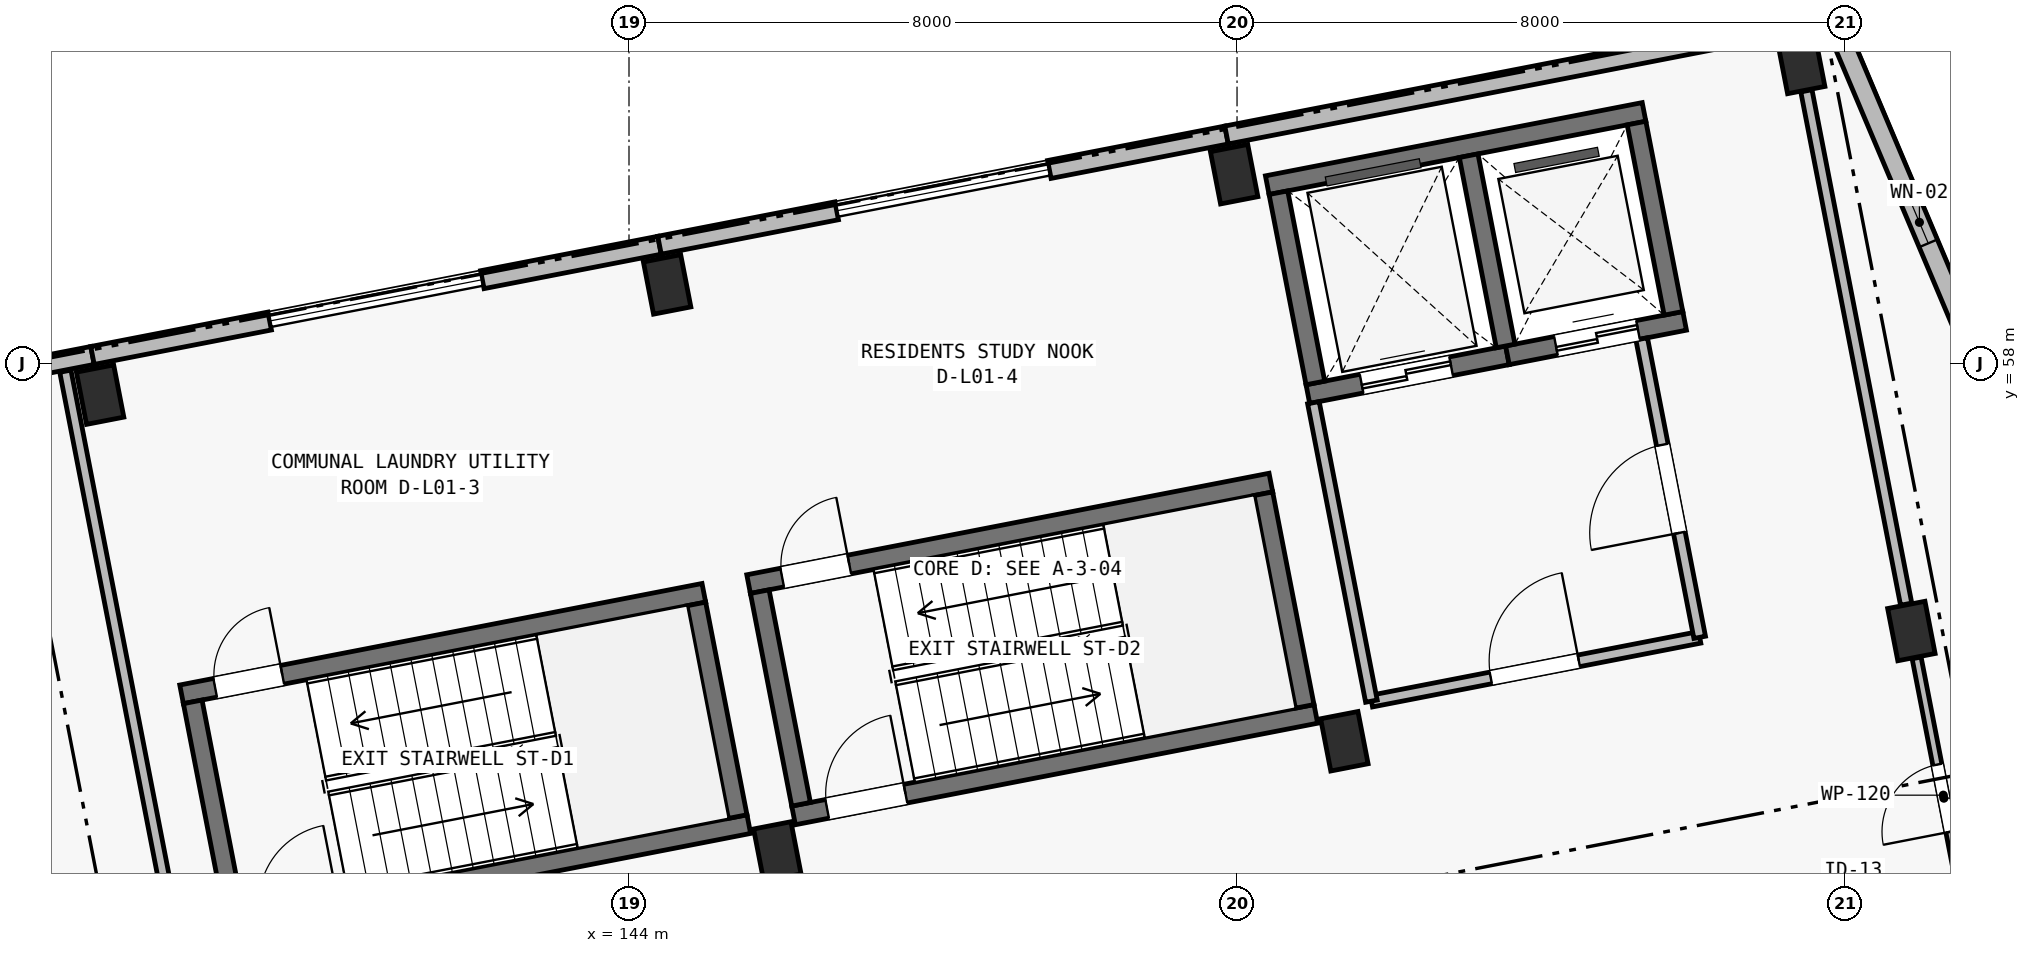
"""IFC4 building model, lengths in metres.
Left out: names, types, materials, properties, quantities, classifications, styles, units other than length and angle.
Written with IfcOpenShell. Run it as: python <this file> out.ifc"""

import sys

from ifc_helpers import new_model, si_unit, direction, frame, frame_2d, origin, origin_2d, place, context, subcontext, project, spatial, rectangle, extrude, element, fill, save


model = new_model("IFC4")
c1 = context("Model", 3, precision=1e-05, world=origin(), true_north=direction((0.0, 1.0)))
c2 = subcontext(c1, "Body", "Model", "MODEL_VIEW")
j1 = project(units=[si_unit("LENGTHUNIT", "METRE"), si_unit("PLANEANGLEUNIT", "RADIAN")], contexts=[c1])
p1 = place(None, origin())
s1 = spatial("IfcSite", under=j1, at=p1, CompositionType="ELEMENT")
p2 = place(p1, origin())
s2 = spatial("IfcBuilding", under=s1, at=p2, CompositionType="ELEMENT")
p3 = place(p2, frame((0.0, 0.0, 4.5)))
s3 = spatial("IfcBuildingStorey", under=s2, at=p3, CompositionType="ELEMENT", Elevation=4.5)
for number, where, z_axis, x_axis in (
    (1, (137.041, 57.59, 0.0), (0.0, 0.0, 1.0), (0.982, 0.191, 0.0)),
    (2, (145.952, 51.58, 0.0), (0.0, 0.0, 1.0), (0.982, 0.191, 0.0)),
    (3, (144.502, 59.041, 0.0), (0.0, 0.0, 1.0), (0.982, 0.191, 0.0)),
    (4, (153.412, 53.03, 0.0), (0.0, 0.0, 1.0), (0.982, 0.191, 0.0)),
    (5, (151.962, 60.491, 0.0), (0.0, 0.0, 1.0), (0.982, 0.191, 0.0)),
    (6, (160.873, 54.48, 0.0), (0.0, 0.0, 1.0), (0.982, 0.191, 0.0)),
    (7, (159.422, 61.941, 0.0), (0.0, 0.0, 1.0), (0.982, 0.191, 0.0)),
):
    element("IfcColumn", number, at=place(p3, frame(where, z_axis=z_axis, x_axis=x_axis)), inside=s3, PredefinedType="COLUMN", context=c2, shape_type="SweptSolid", body=[
        extrude(rectangle(XDim=0.5, YDim=0.7, at=origin_2d()), origin(), (0.0, 0.0, 1.0), 3.9),
    ])
p4 = place(p3, frame((152.397, 60.346, 0.0), z_axis=(0.0, 0.0, 1.0), x_axis=(0.981635261308, 0.190767433692, 0.0)))
e8 = element("IfcWall", 8, at=p4, inside=s3, PredefinedType="SHEAR", context=c2, shape_type="SweptSolid", body=[
    extrude(rectangle(XDim=5.05, YDim=0.25, at=frame_2d((2.525, 0.0))), origin(), (0.0, 0.0, 1.0), 3.9),
])
p5 = place(p3, frame((152.932, 57.598, 0.0), z_axis=(0.0, 0.0, 1.0), x_axis=(0.981636759622, 0.190759723627, 0.0)))
e9 = element("IfcWall", 9, at=p5, inside=s3, PredefinedType="SHEAR", context=c2, shape_type="SweptSolid", body=[
    extrude(rectangle(XDim=2.675, YDim=0.25, at=frame_2d((1.337, 0.0))), origin(), (0.0, 0.0, 1.0), 3.9),
])
p6 = place(p5, frame((0.72, 0.0, 0.0)))
e10 = element("IfcOpeningElement", 10, at=p6, cuts=e9, PredefinedType="OPENING", context=c2, shape_type="SweptSolid", body=[
    extrude(rectangle(XDim=1.2, YDim=2.2, at=frame_2d((0.6, 1.1))), frame((0.0, 0.14, 0.0), z_axis=(0.0, -1.0, 0.0), x_axis=(1.0, 0.0, 0.0)), (0.0, 0.0, 1.0), 0.28),
])
p7 = place(p3, frame((155.558, 58.108, 0.0), z_axis=(0.0, 0.0, 1.0), x_axis=(0.981633573872, 0.190776116556, 0.0)))
e11 = element("IfcWall", 11, at=p7, inside=s3, PredefinedType="SHEAR", context=c2, shape_type="SweptSolid", body=[
    extrude(rectangle(XDim=2.375, YDim=0.25, at=frame_2d((1.188, 0.0))), origin(), (0.0, 0.0, 1.0), 3.9),
])
p8 = place(p7, frame((0.65, 0.0, 0.0)))
e12 = element("IfcOpeningElement", 12, at=p8, cuts=e11, PredefinedType="OPENING", context=c2, shape_type="SweptSolid", body=[
    extrude(rectangle(XDim=1.1, YDim=2.15, at=frame_2d((0.55, 1.075))), frame((0.0, 0.14, 0.0), z_axis=(0.0, -1.0, 0.0), x_axis=(1.0, 0.0, 0.0)), (0.0, 0.0, 1.0), 0.28),
])
for number, where, z_axis, x_axis in (
    (13, (153.031, 57.744, 0.0), (0.0, 0.0, 1.0), (-0.191, 0.982, 0.0)),
    (14, (155.534, 58.231, 0.0), (0.0, 0.0, 1.0), (-0.191, 0.982, 0.0)),
    (15, (157.742, 58.66, 0.0), (0.0, 0.0, 1.0), (-0.191, 0.982, 0.0)),
):
    element("IfcWall", number, at=place(p3, frame(where, z_axis=z_axis, x_axis=x_axis)), inside=s3, PredefinedType="SHEAR", context=c2, shape_type="SweptSolid", body=[
        extrude(rectangle(XDim=2.55, YDim=0.25, at=frame_2d((1.275, 0.0))), origin(), (0.0, 0.0, 1.0), 3.9),
    ])
p9 = place(p3, frame((138.113, 53.647, 0.0), z_axis=(0.0, 0.0, 1.0), x_axis=(0.981626097708, 0.19081458094, 0.0)))
e16 = element("IfcWall", 16, at=p9, inside=s3, PredefinedType="SHEAR", context=c2, shape_type="SweptSolid", body=[
    extrude(rectangle(XDim=7.0, YDim=0.25, at=frame_2d((3.5, 0.0))), origin(), (0.0, 0.0, 1.0), 3.9),
])
p10 = place(p9, frame((0.45, 0.0, 0.0)))
e17 = element("IfcOpeningElement", 17, at=p10, cuts=e16, PredefinedType="OPENING", context=c2, shape_type="SweptSolid", body=[
    extrude(rectangle(XDim=0.9, YDim=2.1, at=frame_2d((0.45, 1.05))), frame((0.0, 0.14, 0.0), z_axis=(0.0, -1.0, 0.0), x_axis=(1.0, 0.0, 0.0)), (0.0, 0.0, 1.0), 0.28),
])
p11 = place(p3, frame((138.705, 50.604, 0.0), z_axis=(0.0, 0.0, 1.0), x_axis=(0.981626097708, 0.19081458094, 0.0)))
e18 = element("IfcWall", 18, at=p11, inside=s3, PredefinedType="SHEAR", context=c2, shape_type="SweptSolid", body=[
    extrude(rectangle(XDim=7.0, YDim=0.25, at=frame_2d((3.5, 0.0))), origin(), (0.0, 0.0, 1.0), 3.9),
])
p12 = place(p11, frame((0.45, 0.0, 0.0)))
e19 = element("IfcOpeningElement", 19, at=p12, cuts=e18, PredefinedType="OPENING", context=c2, shape_type="SweptSolid", body=[
    extrude(rectangle(XDim=1.05, YDim=2.15, at=frame_2d((0.525, 1.075))), frame((0.0, 0.14, 0.0), z_axis=(0.0, -1.0, 0.0), x_axis=(1.0, 0.0, 0.0)), (0.0, 0.0, 1.0), 0.28),
])
p13 = place(p3, frame((138.804, 50.751, 0.0), z_axis=(0.0, 0.0, 1.0), x_axis=(-0.190858194834, 0.981617618762, 0.0)))
e20 = element("IfcWall", 20, at=p13, inside=s3, PredefinedType="SHEAR", context=c2, shape_type="SweptSolid", body=[
    extrude(rectangle(XDim=2.85, YDim=0.25, at=frame_2d((1.425, 0.0))), origin(), (0.0, 0.0, 1.0), 3.9),
])
p14 = place(p3, frame((145.43, 52.039, 0.0), z_axis=(0.0, 0.0, 1.0), x_axis=(-0.190842147128, 0.981620738819, 0.0)))
e21 = element("IfcWall", 21, at=p14, inside=s3, PredefinedType="SHEAR", context=c2, shape_type="SweptSolid", body=[
    extrude(rectangle(XDim=2.85, YDim=0.25, at=frame_2d((1.425, 0.0))), origin(), (0.0, 0.0, 1.0), 3.9),
])
p15 = place(p3, frame((145.574, 55.098, 0.0), z_axis=(0.0, 0.0, 1.0), x_axis=(0.981626097708, 0.19081458094, 0.0)))
e22 = element("IfcWall", 22, at=p15, inside=s3, PredefinedType="SHEAR", context=c2, shape_type="SweptSolid", body=[
    extrude(rectangle(XDim=7.0, YDim=0.25, at=frame_2d((3.5, 0.0))), origin(), (0.0, 0.0, 1.0), 3.9),
])
p16 = place(p15, frame((0.45, 0.0, 0.0)))
e23 = element("IfcOpeningElement", 23, at=p16, cuts=e22, PredefinedType="OPENING", context=c2, shape_type="SweptSolid", body=[
    extrude(rectangle(XDim=0.9, YDim=2.1, at=frame_2d((0.45, 1.05))), frame((0.0, 0.14, 0.0), z_axis=(0.0, -1.0, 0.0), x_axis=(1.0, 0.0, 0.0)), (0.0, 0.0, 1.0), 0.28),
])
p17 = place(p3, frame((146.165, 52.054, 0.0), z_axis=(0.0, 0.0, 1.0), x_axis=(0.981627367538, 0.190808048312, 0.0)))
e24 = element("IfcWall", 24, at=p17, inside=s3, PredefinedType="SHEAR", context=c2, shape_type="SweptSolid", body=[
    extrude(rectangle(XDim=7.0, YDim=0.25, at=frame_2d((3.5, 0.0))), origin(), (0.0, 0.0, 1.0), 3.9),
])
p18 = place(p17, frame((0.45, 0.0, 0.0)))
e25 = element("IfcOpeningElement", 25, at=p18, cuts=e24, PredefinedType="OPENING", context=c2, shape_type="SweptSolid", body=[
    extrude(rectangle(XDim=1.05, YDim=2.15, at=frame_2d((0.525, 1.075))), frame((0.0, 0.14, 0.0), z_axis=(0.0, -1.0, 0.0), x_axis=(1.0, 0.0, 0.0)), (0.0, 0.0, 1.0), 0.28),
])
for number, where, z_axis, x_axis in (
    (26, (146.264, 52.201, 0.0), (0.0, 0.0, 1.0), (-0.191, 0.982, 0.0)),
    (27, (152.89, 53.489, 0.0), (0.0, 0.0, 1.0), (-0.191, 0.982, 0.0)),
):
    element("IfcWall", number, at=place(p3, frame(where, z_axis=z_axis, x_axis=x_axis)), inside=s3, PredefinedType="SHEAR", context=c2, shape_type="SweptSolid", body=[
        extrude(rectangle(XDim=2.85, YDim=0.25, at=frame_2d((1.425, 0.0))), origin(), (0.0, 0.0, 1.0), 3.9),
    ])
p19 = place(p3, frame((129.481, 56.656, 0.0), z_axis=(0.0, 0.0, 1.0), x_axis=(0.981626422232, 0.190812911449, 0.0)))
e28 = element("IfcWall", 28, at=p19, inside=s3, PredefinedType="SOLIDWALL", context=c2, shape_type="SweptSolid", body=[
    extrude(rectangle(XDim=7.6, YDim=0.24, at=frame_2d((3.8, 0.0))), origin(), (0.0, 0.0, 1.0), 3.65),
])
p20 = place(p19, frame((3.0, 0.0, 0.0)))
e29 = element("IfcOpeningElement", 29, at=p20, cuts=e28, PredefinedType="OPENING", context=c2, shape_type="SweptSolid", body=[
    extrude(rectangle(XDim=1.6, YDim=2.15, at=frame_2d((0.8, 1.075))), frame((0.0, 0.135, 0.0), z_axis=(0.0, -1.0, 0.0), x_axis=(1.0, 0.0, 0.0)), (0.0, 0.0, 1.0), 0.27),
])
for number, where, z_axis, x_axis in (
    (30, (136.941, 58.106, 0.0), (0.0, 0.0, 1.0), (0.982, 0.191, 0.0)),
    (31, (142.07, 59.103, 0.0), (0.0, 0.0, 1.0), (0.982, 0.191, 0.0)),
):
    element("IfcWall", number, at=place(p3, frame(where, z_axis=z_axis, x_axis=x_axis)), inside=s3, PredefinedType="SOLIDWALL", context=c2, shape_type="SweptSolid", body=[
        extrude(rectangle(XDim=2.375, YDim=0.24, at=frame_2d((1.188, 0.0))), origin(), (0.0, 0.0, 1.0), 3.65),
    ])
p21 = place(p3, frame((144.401, 59.556, 0.0), z_axis=(0.0, 0.0, 1.0), x_axis=(0.981633573872, 0.190776116556, 0.0)))
e32 = element("IfcWall", 32, at=p21, inside=s3, PredefinedType="SOLIDWALL", context=c2, shape_type="SweptSolid", body=[
    extrude(rectangle(XDim=2.375, YDim=0.24, at=frame_2d((1.188, 0.0))), origin(), (0.0, 0.0, 1.0), 3.65),
])
p22 = place(p3, frame((149.531, 60.553, 0.0), z_axis=(0.0, 0.0, 1.0), x_axis=(0.98161057432, 0.190894422087, 0.0)))
e33 = element("IfcWall", 33, at=p22, inside=s3, PredefinedType="SOLIDWALL", context=c2, shape_type="SweptSolid", body=[
    extrude(rectangle(XDim=2.375, YDim=0.24, at=frame_2d((1.188, 0.0))), origin(), (0.0, 0.0, 1.0), 3.65),
])
p23 = place(p3, frame((151.862, 61.006, 0.0), z_axis=(0.0, 0.0, 1.0), x_axis=(0.981627273155, 0.190808533872, 0.0)))
e34 = element("IfcWall", 34, at=p23, inside=s3, PredefinedType="SOLIDWALL", context=c2, shape_type="SweptSolid", body=[
    extrude(rectangle(XDim=8.125, YDim=0.24, at=frame_2d((4.062, 0.0))), origin(), (0.0, 0.0, 1.0), 3.65),
])
p24 = place(p23, frame((6.525, 0.0, 0.45)))
e35 = element("IfcOpeningElement", 35, at=p24, cuts=e34, PredefinedType="OPENING", context=c2, shape_type="SweptSolid", body=[
    extrude(rectangle(XDim=0.75, YDim=2.32, at=frame_2d((0.375, 1.16))), frame((0.0, 0.135, 0.0), z_axis=(0.0, -1.0, 0.0), x_axis=(1.0, 0.0, 0.0)), (0.0, 0.0, 1.0), 0.27),
])
p25 = place(p3, frame((159.837, 62.556, 0.0), z_axis=(0.0, 0.0, 1.0), x_axis=(0.389225507936, -0.921142499276, 0.0)))
e36 = element("IfcWall", 36, at=p25, inside=s3, PredefinedType="SOLIDWALL", context=c2, shape_type="SweptSolid", body=[
    extrude(rectangle(XDim=17.91, YDim=0.26, at=frame_2d((8.955, 0.0))), origin(), (0.0, 0.0, 1.0), 3.65),
])
p26 = place(p25, frame((2.63, 0.0, 0.52)))
e37 = element("IfcOpeningElement", 37, at=p26, cuts=e36, PredefinedType="OPENING", context=c2, shape_type="SweptSolid", body=[
    extrude(rectangle(XDim=0.6, YDim=2.22, at=frame_2d((0.3, 1.11))), frame((0.0, 0.145, 0.0), z_axis=(0.0, -1.0, 0.0), x_axis=(1.0, 0.0, 0.0)), (0.0, 0.0, 1.0), 0.29),
])
p27 = place(p25, frame((14.18, 0.0, 0.45)))
e38 = element("IfcOpeningElement", 38, at=p27, cuts=e36, PredefinedType="OPENING", context=c2, shape_type="SweptSolid", body=[
    extrude(rectangle(XDim=0.74, YDim=2.26, at=frame_2d((0.37, 1.13))), frame((0.0, 0.145, 0.0), z_axis=(0.0, -1.0, 0.0), x_axis=(1.0, 0.0, 0.0)), (0.0, 0.0, 1.0), 0.29),
])
p28 = place(p3, frame((153.768, 53.558, 0.0), z_axis=(0.0, 0.0, 1.0), x_axis=(0.981624918225, 0.190820648566, 0.0)))
e39 = element("IfcWall", 39, at=p28, inside=s3, PredefinedType="PARTITIONING", context=c2, shape_type="SweptSolid", body=[
    extrude(rectangle(XDim=4.4, YDim=0.155, at=frame_2d((2.2, 0.0))), origin(), (0.0, 0.0, 1.0), 3.62),
])
p29 = place(p28, frame((1.6, 0.0, 0.0)))
e40 = element("IfcOpeningElement", 40, at=p29, cuts=e39, PredefinedType="OPENING", context=c2, shape_type="SweptSolid", body=[
    extrude(rectangle(XDim=1.18, YDim=2.15, at=frame_2d((0.59, 1.075))), frame((0.0, 0.093, 0.0), z_axis=(0.0, -1.0, 0.0), x_axis=(1.0, 0.0, 0.0)), (0.0, 0.0, 1.0), 0.185),
])
p30 = place(p3, frame((153.768, 53.558, 0.0), z_axis=(0.0, 0.0, 1.0), x_axis=(-0.19085495634, 0.981618248425, 0.0)))
e41 = element("IfcWall", 41, at=p30, inside=s3, PredefinedType="PARTITIONING", context=c2, shape_type="SweptSolid", body=[
    extrude(rectangle(XDim=4.0, YDim=0.155, at=frame_2d((2.0, 0.0))), origin(), (0.0, 0.0, 1.0), 3.62),
])
p31 = place(p3, frame((158.087, 54.397, 0.0), z_axis=(0.0, 0.0, 1.0), x_axis=(-0.190796144009, 0.981629681413, 0.0)))
e42 = element("IfcWall", 42, at=p31, inside=s3, PredefinedType="PARTITIONING", context=c2, shape_type="SweptSolid", body=[
    extrude(rectangle(XDim=4.0, YDim=0.155, at=frame_2d((2.0, 0.0))), origin(), (0.0, 0.0, 1.0), 3.62),
])
p32 = place(p31, frame((1.4, 0.0, 0.0)))
e43 = element("IfcOpeningElement", 43, at=p32, cuts=e42, PredefinedType="OPENING", context=c2, shape_type="SweptSolid", body=[
    extrude(rectangle(XDim=1.18, YDim=2.15, at=frame_2d((0.59, 1.075))), frame((0.0, 0.093, 0.0), z_axis=(0.0, -1.0, 0.0), x_axis=(1.0, 0.0, 0.0)), (0.0, 0.0, 1.0), 0.185),
])
p33 = place(p3, frame((161.643, 50.515, 0.0), z_axis=(0.0, 0.0, 1.0), x_axis=(-0.190805731561, 0.981627817864, 0.0)))
e44 = element("IfcWall", 44, at=p33, inside=s3, PredefinedType="PARTITIONING", context=c2, shape_type="SweptSolid", body=[
    extrude(rectangle(XDim=3.68, YDim=0.12, at=frame_2d((1.84, 0.0))), origin(), (0.0, 0.0, 1.0), 3.15),
])
p34 = place(p33, frame((1.35, 0.0, 0.0)))
e45 = element("IfcOpeningElement", 45, at=p34, cuts=e44, PredefinedType="OPENING", context=c2, shape_type="SweptSolid", body=[
    extrude(rectangle(XDim=0.9, YDim=2.1, at=frame_2d((0.45, 1.05))), frame((0.0, 0.075, 0.0), z_axis=(0.0, -1.0, 0.0), x_axis=(1.0, 0.0, 0.0)), (0.0, 0.0, 1.0), 0.15),
])
p35 = place(p3, frame((160.804, 54.834, 0.0), z_axis=(0.0, 0.0, 1.0), x_axis=(-0.190804123115, 0.981628130507, 0.0)))
e46 = element("IfcWall", 46, at=p35, inside=s3, PredefinedType="PARTITIONING", context=c2, shape_type="SweptSolid", body=[
    extrude(rectangle(XDim=6.88, YDim=0.15, at=frame_2d((3.44, 0.0))), origin(), (0.0, 0.0, 1.0), 3.15),
])
p36 = place(p3, frame((138.467, 48.21, 0.0), z_axis=(0.0, 0.0, 1.0), x_axis=(-0.190814044018, 0.981626202078, 0.0)))
e47 = element("IfcWall", 47, at=p36, inside=s3, PredefinedType="PARTITIONING", context=c2, shape_type="SweptSolid", body=[
    extrude(rectangle(XDim=9.87, YDim=0.15, at=frame_2d((4.935, 0.0))), origin(), (0.0, 0.0, 1.0), 3.62),
])
p37 = place(p26, origin())
e48 = element("IfcWindow", 48, at=p37, inside=s3, PartitioningType="SINGLE_PANEL", PredefinedType="WINDOW", context=c2, shape_type="SweptSolid", body=[
    extrude(rectangle(XDim=0.6, YDim=2.22, at=frame_2d((0.3, 1.11))), frame((0.0, 0.03, 0.0), z_axis=(0.0, -1.0, 0.0), x_axis=(1.0, 0.0, 0.0)), (0.0, 0.0, 1.0), 0.06),
])
fill(e37, e48)
p38 = place(p29, origin())
e49 = element("IfcDoor", 49, at=p38, inside=s3, OperationType="SINGLE_SWING_RIGHT", PredefinedType="DOOR", context=c2, shape_type="SweptSolid", body=[
    extrude(rectangle(XDim=1.18, YDim=2.15, at=frame_2d((0.59, 1.075))), frame((0.0, 0.025, 0.0), z_axis=(0.0, -1.0, 0.0), x_axis=(1.0, 0.0, 0.0)), (0.0, 0.0, 1.0), 0.05),
])
fill(e40, e49)
p39 = place(p32, origin())
e50 = element("IfcDoor", 50, at=p39, inside=s3, OperationType="SINGLE_SWING_LEFT", PredefinedType="DOOR", context=c2, shape_type="SweptSolid", body=[
    extrude(rectangle(XDim=1.18, YDim=2.15, at=frame_2d((0.59, 1.075))), frame((0.0, 0.025, 0.0), z_axis=(0.0, -1.0, 0.0), x_axis=(1.0, 0.0, 0.0)), (0.0, 0.0, 1.0), 0.05),
])
fill(e43, e50)
p40 = place(p34, origin())
e51 = element("IfcDoor", 51, at=p40, inside=s3, OperationType="SINGLE_SWING_LEFT", PredefinedType="DOOR", context=c2, shape_type="SweptSolid", body=[
    extrude(rectangle(XDim=0.9, YDim=2.1, at=frame_2d((0.45, 1.05))), frame((0.0, 0.025, 0.0), z_axis=(0.0, -1.0, 0.0), x_axis=(1.0, 0.0, 0.0)), (0.0, 0.0, 1.0), 0.05),
])
fill(e45, e51)
p41 = place(p10, origin())
e52 = element("IfcDoor", 52, at=p41, inside=s3, OperationType="SINGLE_SWING_RIGHT", PredefinedType="DOOR", context=c2, shape_type="SweptSolid", body=[
    extrude(rectangle(XDim=0.9, YDim=2.1, at=frame_2d((0.45, 1.05))), frame((0.0, 0.025, 0.0), z_axis=(0.0, -1.0, 0.0), x_axis=(1.0, 0.0, 0.0)), (0.0, 0.0, 1.0), 0.05),
])
fill(e17, e52)
p42 = place(p18, origin())
e53 = element("IfcDoor", 53, at=p42, inside=s3, OperationType="SINGLE_SWING_RIGHT", PredefinedType="DOOR", context=c2, shape_type="SweptSolid", body=[
    extrude(rectangle(XDim=1.05, YDim=2.15, at=frame_2d((0.525, 1.075))), frame((0.0, 0.025, 0.0), z_axis=(0.0, -1.0, 0.0), x_axis=(1.0, 0.0, 0.0)), (0.0, 0.0, 1.0), 0.05),
])
fill(e25, e53)
p43 = place(p16, origin())
e54 = element("IfcDoor", 54, at=p43, inside=s3, OperationType="SINGLE_SWING_RIGHT", PredefinedType="DOOR", context=c2, shape_type="SweptSolid", body=[
    extrude(rectangle(XDim=0.9, YDim=2.1, at=frame_2d((0.45, 1.05))), frame((0.0, 0.025, 0.0), z_axis=(0.0, -1.0, 0.0), x_axis=(1.0, 0.0, 0.0)), (0.0, 0.0, 1.0), 0.05),
])
fill(e23, e54)
p44 = place(p6, origin())
e55 = element("IfcDoor", 55, at=p44, inside=s3, OperationType="DOUBLE_DOOR_SLIDING", PredefinedType="DOOR", context=c2, shape_type="SweptSolid", body=[
    extrude(rectangle(XDim=1.2, YDim=2.2, at=frame_2d((0.6, 1.1))), frame((0.0, 0.025, 0.0), z_axis=(0.0, -1.0, 0.0), x_axis=(1.0, 0.0, 0.0)), (0.0, 0.0, 1.0), 0.05),
])
fill(e10, e55)
p45 = place(p8, origin())
e56 = element("IfcDoor", 56, at=p45, inside=s3, OperationType="DOUBLE_DOOR_SLIDING", PredefinedType="DOOR", context=c2, shape_type="SweptSolid", body=[
    extrude(rectangle(XDim=1.1, YDim=2.15, at=frame_2d((0.55, 1.075))), frame((0.0, 0.025, 0.0), z_axis=(0.0, -1.0, 0.0), x_axis=(1.0, 0.0, 0.0)), (0.0, 0.0, 1.0), 0.05),
])
fill(e12, e56)
save(model, sys.argv[1])
